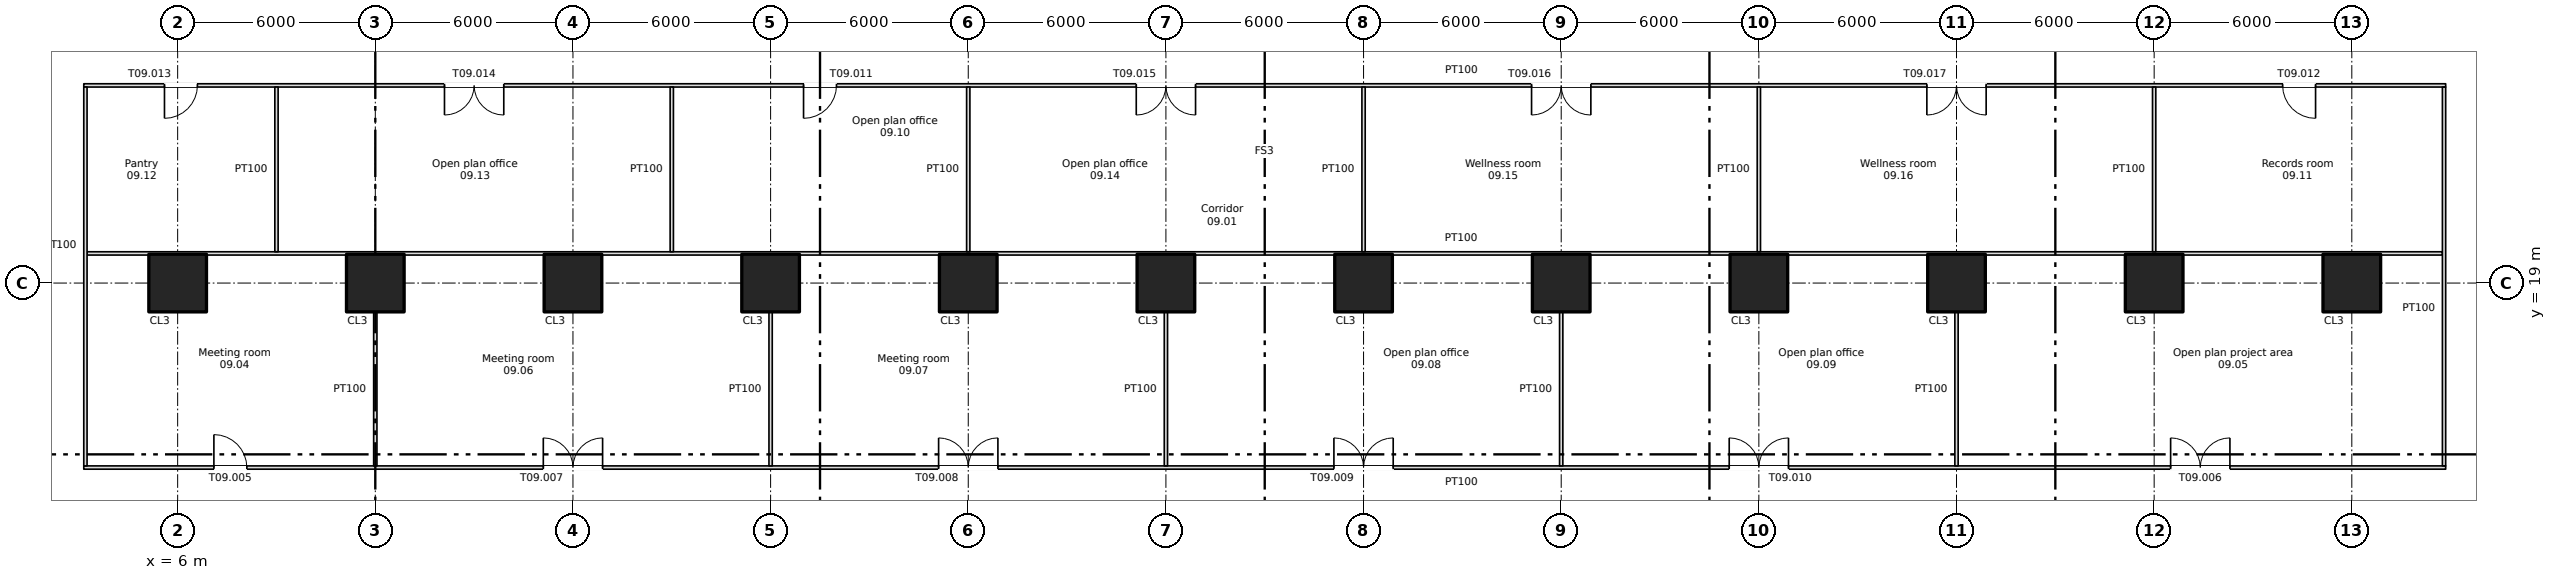
"""IFC4 building model, lengths in metres.
Left out: names, types, materials, properties, quantities, classifications, styles, units other than length and angle.
Written with IfcOpenShell. Run it as: python <this file> out.ifc"""

import sys

from ifc_helpers import new_model, si_unit, direction, frame, frame_2d, origin, origin_2d, place, context, subcontext, project, spatial, rectangle, extrude, element, fill, save


model = new_model("IFC4")
c1 = context("Model", 3, precision=1e-05, world=origin(), true_north=direction((0.0, 1.0)))
c2 = subcontext(c1, "Body", "Model", "MODEL_VIEW")
j1 = project(units=[si_unit("LENGTHUNIT", "METRE"), si_unit("PLANEANGLEUNIT", "RADIAN")], contexts=[c1])
p1 = place(None, origin())
s1 = spatial("IfcSite", under=j1, at=p1, CompositionType="ELEMENT")
p2 = place(p1, origin())
s2 = spatial("IfcBuilding", under=s1, at=p2, CompositionType="ELEMENT")
p3 = place(p2, frame((0.0, 0.0, 37.5)))
s3 = spatial("IfcBuildingStorey", under=s2, at=p3, CompositionType="ELEMENT", Elevation=37.5)
for number, where, z_axis, x_axis in (
    (1, (6.0, 19.0, 0.0), (0.0, 0.0, 1.0), (1.0, 0.0, 0.0)),
    (2, (12.0, 19.0, 0.0), (0.0, 0.0, 1.0), (1.0, 0.0, 0.0)),
    (3, (18.0, 19.0, 0.0), (0.0, 0.0, 1.0), (1.0, 0.0, 0.0)),
    (4, (24.0, 19.0, 0.0), (0.0, 0.0, 1.0), (1.0, 0.0, 0.0)),
    (5, (30.0, 19.0, 0.0), (0.0, 0.0, 1.0), (1.0, 0.0, 0.0)),
    (6, (36.0, 19.0, 0.0), (0.0, 0.0, 1.0), (1.0, 0.0, 0.0)),
    (7, (42.0, 19.0, 0.0), (0.0, 0.0, 1.0), (1.0, 0.0, 0.0)),
    (8, (48.0, 19.0, 0.0), (0.0, 0.0, 1.0), (1.0, 0.0, 0.0)),
    (9, (54.0, 19.0, 0.0), (0.0, 0.0, 1.0), (1.0, 0.0, 0.0)),
    (10, (60.0, 19.0, 0.0), (0.0, 0.0, 1.0), (1.0, 0.0, 0.0)),
    (11, (66.0, 19.0, 0.0), (0.0, 0.0, 1.0), (1.0, 0.0, 0.0)),
    (12, (72.0, 19.0, 0.0), (0.0, 0.0, 1.0), (1.0, 0.0, 0.0)),
):
    element("IfcColumn", number, at=place(p3, frame(where, z_axis=z_axis, x_axis=x_axis)), inside=s3, PredefinedType="COLUMN", context=c2, shape_type="SweptSolid", body=[
        extrude(rectangle(XDim=1.75, YDim=1.75, at=origin_2d()), origin(), (0.0, 0.0, 1.0), 3.35),
    ])
p4 = place(p3, frame((3.15, 13.4, 0.0), z_axis=(0.0, 0.0, 1.0), x_axis=(1.0, 0.0, 0.0)))
e13 = element("IfcWall", 13, at=p4, inside=s3, PredefinedType="PARTITIONING", context=c2, shape_type="SweptSolid", body=[
    extrude(rectangle(XDim=71.7, YDim=0.1, at=frame_2d((35.85, 0.0))), origin(), (0.0, 0.0, 1.0), 3.35),
])
p5 = place(p4, frame((3.95, 0.0, 0.0)))
e14 = element("IfcOpeningElement", 14, at=p5, cuts=e13, PredefinedType="OPENING", context=c2, shape_type="SweptSolid", body=[
    extrude(rectangle(XDim=1.0, YDim=2.1, at=frame_2d((0.5, 1.05))), frame((0.0, 0.06, 0.0), z_axis=(0.0, -1.0, 0.0), x_axis=(1.0, 0.0, 0.0)), (0.0, 0.0, 1.0), 0.12),
])
p6 = place(p4, frame((63.35, 0.0, 0.0)))
e15 = element("IfcOpeningElement", 15, at=p6, cuts=e13, PredefinedType="OPENING", context=c2, shape_type="SweptSolid", body=[
    extrude(rectangle(XDim=1.8, YDim=2.1, at=frame_2d((0.9, 1.05))), frame((0.0, 0.06, 0.0), z_axis=(0.0, -1.0, 0.0), x_axis=(1.0, 0.0, 0.0)), (0.0, 0.0, 1.0), 0.12),
])
p7 = place(p4, frame((13.95, 0.0, 0.0)))
e16 = element("IfcOpeningElement", 16, at=p7, cuts=e13, PredefinedType="OPENING", context=c2, shape_type="SweptSolid", body=[
    extrude(rectangle(XDim=1.8, YDim=2.1, at=frame_2d((0.9, 1.05))), frame((0.0, 0.06, 0.0), z_axis=(0.0, -1.0, 0.0), x_axis=(1.0, 0.0, 0.0)), (0.0, 0.0, 1.0), 0.12),
])
p8 = place(p4, frame((25.95, 0.0, 0.0)))
e17 = element("IfcOpeningElement", 17, at=p8, cuts=e13, PredefinedType="OPENING", context=c2, shape_type="SweptSolid", body=[
    extrude(rectangle(XDim=1.8, YDim=2.1, at=frame_2d((0.9, 1.05))), frame((0.0, 0.06, 0.0), z_axis=(0.0, -1.0, 0.0), x_axis=(1.0, 0.0, 0.0)), (0.0, 0.0, 1.0), 0.12),
])
p9 = place(p4, frame((37.95, 0.0, 0.0)))
e18 = element("IfcOpeningElement", 18, at=p9, cuts=e13, PredefinedType="OPENING", context=c2, shape_type="SweptSolid", body=[
    extrude(rectangle(XDim=1.8, YDim=2.1, at=frame_2d((0.9, 1.05))), frame((0.0, 0.06, 0.0), z_axis=(0.0, -1.0, 0.0), x_axis=(1.0, 0.0, 0.0)), (0.0, 0.0, 1.0), 0.12),
])
p10 = place(p4, frame((49.95, 0.0, 0.0)))
e19 = element("IfcOpeningElement", 19, at=p10, cuts=e13, PredefinedType="OPENING", context=c2, shape_type="SweptSolid", body=[
    extrude(rectangle(XDim=1.8, YDim=2.1, at=frame_2d((0.9, 1.05))), frame((0.0, 0.06, 0.0), z_axis=(0.0, -1.0, 0.0), x_axis=(1.0, 0.0, 0.0)), (0.0, 0.0, 1.0), 0.12),
])
p11 = place(p3, frame((3.25, 19.9, 0.0), z_axis=(0.0, 0.0, 1.0), x_axis=(1.0, 0.0, 0.0)))
e20 = element("IfcWall", 20, at=p11, inside=s3, PredefinedType="PARTITIONING", context=c2, shape_type="SweptSolid", body=[
    extrude(rectangle(XDim=71.5, YDim=0.1, at=frame_2d((35.75, 0.0))), origin(), (0.0, 0.0, 1.0), 3.35),
])
p12 = place(p3, frame((3.15, 25.0, 0.0), z_axis=(0.0, 0.0, 1.0), x_axis=(1.0, 0.0, 0.0)))
e21 = element("IfcWall", 21, at=p12, inside=s3, PredefinedType="PARTITIONING", context=c2, shape_type="SweptSolid", body=[
    extrude(rectangle(XDim=71.7, YDim=0.1, at=frame_2d((35.85, 0.0))), origin(), (0.0, 0.0, 1.0), 3.35),
])
p13 = place(p12, frame((21.85, 0.0, 0.0)))
e22 = element("IfcOpeningElement", 22, at=p13, cuts=e21, PredefinedType="OPENING", context=c2, shape_type="SweptSolid", body=[
    extrude(rectangle(XDim=1.0, YDim=2.1, at=frame_2d((0.5, 1.05))), frame((0.0, 0.06, 0.0), z_axis=(0.0, -1.0, 0.0), x_axis=(1.0, 0.0, 0.0)), (0.0, 0.0, 1.0), 0.12),
])
p14 = place(p12, frame((66.75, 0.0, 0.0)))
e23 = element("IfcOpeningElement", 23, at=p14, cuts=e21, PredefinedType="OPENING", context=c2, shape_type="SweptSolid", body=[
    extrude(rectangle(XDim=1.0, YDim=2.1, at=frame_2d((0.5, 1.05))), frame((0.0, 0.06, 0.0), z_axis=(0.0, -1.0, 0.0), x_axis=(1.0, 0.0, 0.0)), (0.0, 0.0, 1.0), 0.12),
])
p15 = place(p12, frame((2.45, 0.0, 0.0)))
e24 = element("IfcOpeningElement", 24, at=p15, cuts=e21, PredefinedType="OPENING", context=c2, shape_type="SweptSolid", body=[
    extrude(rectangle(XDim=1.0, YDim=2.1, at=frame_2d((0.5, 1.05))), frame((0.0, 0.06, 0.0), z_axis=(0.0, -1.0, 0.0), x_axis=(1.0, 0.0, 0.0)), (0.0, 0.0, 1.0), 0.12),
])
p16 = place(p12, frame((10.95, 0.0, 0.0)))
e25 = element("IfcOpeningElement", 25, at=p16, cuts=e21, PredefinedType="OPENING", context=c2, shape_type="SweptSolid", body=[
    extrude(rectangle(XDim=1.8, YDim=2.1, at=frame_2d((0.9, 1.05))), frame((0.0, 0.06, 0.0), z_axis=(0.0, -1.0, 0.0), x_axis=(1.0, 0.0, 0.0)), (0.0, 0.0, 1.0), 0.12),
])
p17 = place(p12, frame((31.95, 0.0, 0.0)))
e26 = element("IfcOpeningElement", 26, at=p17, cuts=e21, PredefinedType="OPENING", context=c2, shape_type="SweptSolid", body=[
    extrude(rectangle(XDim=1.8, YDim=2.1, at=frame_2d((0.9, 1.05))), frame((0.0, 0.06, 0.0), z_axis=(0.0, -1.0, 0.0), x_axis=(1.0, 0.0, 0.0)), (0.0, 0.0, 1.0), 0.12),
])
p18 = place(p12, frame((43.95, 0.0, 0.0)))
e27 = element("IfcOpeningElement", 27, at=p18, cuts=e21, PredefinedType="OPENING", context=c2, shape_type="SweptSolid", body=[
    extrude(rectangle(XDim=1.8, YDim=2.1, at=frame_2d((0.9, 1.05))), frame((0.0, 0.06, 0.0), z_axis=(0.0, -1.0, 0.0), x_axis=(1.0, 0.0, 0.0)), (0.0, 0.0, 1.0), 0.12),
])
p19 = place(p12, frame((55.95, 0.0, 0.0)))
e28 = element("IfcOpeningElement", 28, at=p19, cuts=e21, PredefinedType="OPENING", context=c2, shape_type="SweptSolid", body=[
    extrude(rectangle(XDim=1.8, YDim=2.1, at=frame_2d((0.9, 1.05))), frame((0.0, 0.06, 0.0), z_axis=(0.0, -1.0, 0.0), x_axis=(1.0, 0.0, 0.0)), (0.0, 0.0, 1.0), 0.12),
])
p20 = place(p3, frame((3.2, 13.45, 0.0), z_axis=(0.0, 0.0, 1.0), x_axis=(0.0, 1.0, 0.0)))
e29 = element("IfcWall", 29, at=p20, inside=s3, PredefinedType="PARTITIONING", context=c2, shape_type="SweptSolid", body=[
    extrude(rectangle(XDim=11.5, YDim=0.1, at=frame_2d((5.75, 0.0))), origin(), (0.0, 0.0, 1.0), 3.35),
])
p21 = place(p3, frame((9.0, 19.95, 0.0), z_axis=(0.0, 0.0, 1.0), x_axis=(0.0, 1.0, 0.0)))
e30 = element("IfcWall", 30, at=p21, inside=s3, PredefinedType="PARTITIONING", context=c2, shape_type="SweptSolid", body=[
    extrude(rectangle(XDim=5.0, YDim=0.1, at=frame_2d((2.5, 0.0))), origin(), (0.0, 0.0, 1.0), 3.35),
])
p22 = place(p3, frame((12.0, 13.45, 0.0), z_axis=(0.0, 0.0, 1.0), x_axis=(0.0, 1.0, 0.0)))
e31 = element("IfcWall", 31, at=p22, inside=s3, PredefinedType="PARTITIONING", context=c2, shape_type="SweptSolid", body=[
    extrude(rectangle(XDim=4.675, YDim=0.1, at=frame_2d((2.337, 0.0))), origin(), (0.0, 0.0, 1.0), 3.35),
])
p23 = place(p3, frame((21.0, 19.95, 0.0), z_axis=(0.0, 0.0, 1.0), x_axis=(0.0, 1.0, 0.0)))
e32 = element("IfcWall", 32, at=p23, inside=s3, PredefinedType="PARTITIONING", context=c2, shape_type="SweptSolid", body=[
    extrude(rectangle(XDim=5.0, YDim=0.1, at=frame_2d((2.5, 0.0))), origin(), (0.0, 0.0, 1.0), 3.35),
])
p24 = place(p3, frame((24.0, 13.45, 0.0), z_axis=(0.0, 0.0, 1.0), x_axis=(0.0, 1.0, 0.0)))
e33 = element("IfcWall", 33, at=p24, inside=s3, PredefinedType="PARTITIONING", context=c2, shape_type="SweptSolid", body=[
    extrude(rectangle(XDim=4.675, YDim=0.1, at=frame_2d((2.337, 0.0))), origin(), (0.0, 0.0, 1.0), 3.35),
])
p25 = place(p3, frame((30.0, 19.95, 0.0), z_axis=(0.0, 0.0, 1.0), x_axis=(0.0, 1.0, 0.0)))
e34 = element("IfcWall", 34, at=p25, inside=s3, PredefinedType="PARTITIONING", context=c2, shape_type="SweptSolid", body=[
    extrude(rectangle(XDim=5.0, YDim=0.1, at=frame_2d((2.5, 0.0))), origin(), (0.0, 0.0, 1.0), 3.35),
])
p26 = place(p3, frame((36.0, 13.45, 0.0), z_axis=(0.0, 0.0, 1.0), x_axis=(0.0, 1.0, 0.0)))
e35 = element("IfcWall", 35, at=p26, inside=s3, PredefinedType="PARTITIONING", context=c2, shape_type="SweptSolid", body=[
    extrude(rectangle(XDim=4.675, YDim=0.1, at=frame_2d((2.337, 0.0))), origin(), (0.0, 0.0, 1.0), 3.35),
])
p27 = place(p3, frame((42.0, 19.95, 0.0), z_axis=(0.0, 0.0, 1.0), x_axis=(0.0, 1.0, 0.0)))
e36 = element("IfcWall", 36, at=p27, inside=s3, PredefinedType="PARTITIONING", context=c2, shape_type="SweptSolid", body=[
    extrude(rectangle(XDim=5.0, YDim=0.1, at=frame_2d((2.5, 0.0))), origin(), (0.0, 0.0, 1.0), 3.35),
])
p28 = place(p3, frame((48.0, 13.45, 0.0), z_axis=(0.0, 0.0, 1.0), x_axis=(0.0, 1.0, 0.0)))
e37 = element("IfcWall", 37, at=p28, inside=s3, PredefinedType="PARTITIONING", context=c2, shape_type="SweptSolid", body=[
    extrude(rectangle(XDim=4.675, YDim=0.1, at=frame_2d((2.337, 0.0))), origin(), (0.0, 0.0, 1.0), 3.35),
])
p29 = place(p3, frame((54.0, 19.95, 0.0), z_axis=(0.0, 0.0, 1.0), x_axis=(0.0, 1.0, 0.0)))
e38 = element("IfcWall", 38, at=p29, inside=s3, PredefinedType="PARTITIONING", context=c2, shape_type="SweptSolid", body=[
    extrude(rectangle(XDim=5.0, YDim=0.1, at=frame_2d((2.5, 0.0))), origin(), (0.0, 0.0, 1.0), 3.35),
])
p30 = place(p3, frame((60.0, 13.45, 0.0), z_axis=(0.0, 0.0, 1.0), x_axis=(0.0, 1.0, 0.0)))
e39 = element("IfcWall", 39, at=p30, inside=s3, PredefinedType="PARTITIONING", context=c2, shape_type="SweptSolid", body=[
    extrude(rectangle(XDim=4.675, YDim=0.1, at=frame_2d((2.337, 0.0))), origin(), (0.0, 0.0, 1.0), 3.35),
])
p31 = place(p3, frame((66.0, 19.95, 0.0), z_axis=(0.0, 0.0, 1.0), x_axis=(0.0, 1.0, 0.0)))
e40 = element("IfcWall", 40, at=p31, inside=s3, PredefinedType="PARTITIONING", context=c2, shape_type="SweptSolid", body=[
    extrude(rectangle(XDim=5.0, YDim=0.1, at=frame_2d((2.5, 0.0))), origin(), (0.0, 0.0, 1.0), 3.35),
])
p32 = place(p3, frame((74.8, 13.45, 0.0), z_axis=(0.0, 0.0, 1.0), x_axis=(0.0, 1.0, 0.0)))
e41 = element("IfcWall", 41, at=p32, inside=s3, PredefinedType="PARTITIONING", context=c2, shape_type="SweptSolid", body=[
    extrude(rectangle(XDim=11.5, YDim=0.1, at=frame_2d((5.75, 0.0))), origin(), (0.0, 0.0, 1.0), 3.35),
])
p33 = place(p5, origin())
e42 = element("IfcDoor", 42, at=p33, inside=s3, OperationType="SINGLE_SWING_LEFT", PredefinedType="DOOR", context=c2, shape_type="SweptSolid", body=[
    extrude(rectangle(XDim=1.0, YDim=2.1, at=frame_2d((0.5, 1.05))), frame((0.0, 0.025, 0.0), z_axis=(0.0, -1.0, 0.0), x_axis=(1.0, 0.0, 0.0)), (0.0, 0.0, 1.0), 0.05),
])
fill(e14, e42)
p34 = place(p6, origin())
e43 = element("IfcDoor", 43, at=p34, inside=s3, OperationType="DOUBLE_DOOR_SINGLE_SWING", PredefinedType="DOOR", context=c2, shape_type="SweptSolid", body=[
    extrude(rectangle(XDim=1.8, YDim=2.1, at=frame_2d((0.9, 1.05))), frame((0.0, 0.025, 0.0), z_axis=(0.0, -1.0, 0.0), x_axis=(1.0, 0.0, 0.0)), (0.0, 0.0, 1.0), 0.05),
])
fill(e15, e43)
p35 = place(p7, origin())
e44 = element("IfcDoor", 44, at=p35, inside=s3, OperationType="DOUBLE_DOOR_SINGLE_SWING", PredefinedType="DOOR", context=c2, shape_type="SweptSolid", body=[
    extrude(rectangle(XDim=1.8, YDim=2.1, at=frame_2d((0.9, 1.05))), frame((0.0, 0.025, 0.0), z_axis=(0.0, -1.0, 0.0), x_axis=(1.0, 0.0, 0.0)), (0.0, 0.0, 1.0), 0.05),
])
fill(e16, e44)
p36 = place(p8, origin())
e45 = element("IfcDoor", 45, at=p36, inside=s3, OperationType="DOUBLE_DOOR_SINGLE_SWING", PredefinedType="DOOR", context=c2, shape_type="SweptSolid", body=[
    extrude(rectangle(XDim=1.8, YDim=2.1, at=frame_2d((0.9, 1.05))), frame((0.0, 0.025, 0.0), z_axis=(0.0, -1.0, 0.0), x_axis=(1.0, 0.0, 0.0)), (0.0, 0.0, 1.0), 0.05),
])
fill(e17, e45)
p37 = place(p9, origin())
e46 = element("IfcDoor", 46, at=p37, inside=s3, OperationType="DOUBLE_DOOR_SINGLE_SWING", PredefinedType="DOOR", context=c2, shape_type="SweptSolid", body=[
    extrude(rectangle(XDim=1.8, YDim=2.1, at=frame_2d((0.9, 1.05))), frame((0.0, 0.025, 0.0), z_axis=(0.0, -1.0, 0.0), x_axis=(1.0, 0.0, 0.0)), (0.0, 0.0, 1.0), 0.05),
])
fill(e18, e46)
p38 = place(p10, origin())
e47 = element("IfcDoor", 47, at=p38, inside=s3, OperationType="DOUBLE_DOOR_SINGLE_SWING", PredefinedType="DOOR", context=c2, shape_type="SweptSolid", body=[
    extrude(rectangle(XDim=1.8, YDim=2.1, at=frame_2d((0.9, 1.05))), frame((0.0, 0.025, 0.0), z_axis=(0.0, -1.0, 0.0), x_axis=(1.0, 0.0, 0.0)), (0.0, 0.0, 1.0), 0.05),
])
fill(e19, e47)
p39 = place(p13, origin())
e48 = element("IfcDoor", 48, at=p39, inside=s3, OperationType="SINGLE_SWING_LEFT", PredefinedType="DOOR", context=c2, shape_type="SweptSolid", body=[
    extrude(rectangle(XDim=1.0, YDim=2.1, at=frame_2d((0.5, 1.05))), frame((0.0, 0.025, 0.0), z_axis=(0.0, -1.0, 0.0), x_axis=(1.0, 0.0, 0.0)), (0.0, 0.0, 1.0), 0.05),
])
fill(e22, e48)
p40 = place(p14, origin())
e49 = element("IfcDoor", 49, at=p40, inside=s3, OperationType="SINGLE_SWING_RIGHT", PredefinedType="DOOR", context=c2, shape_type="SweptSolid", body=[
    extrude(rectangle(XDim=1.0, YDim=2.1, at=frame_2d((0.5, 1.05))), frame((0.0, 0.025, 0.0), z_axis=(0.0, -1.0, 0.0), x_axis=(1.0, 0.0, 0.0)), (0.0, 0.0, 1.0), 0.05),
])
fill(e23, e49)
p41 = place(p15, origin())
e50 = element("IfcDoor", 50, at=p41, inside=s3, OperationType="SINGLE_SWING_LEFT", PredefinedType="DOOR", context=c2, shape_type="SweptSolid", body=[
    extrude(rectangle(XDim=1.0, YDim=2.1, at=frame_2d((0.5, 1.05))), frame((0.0, 0.025, 0.0), z_axis=(0.0, -1.0, 0.0), x_axis=(1.0, 0.0, 0.0)), (0.0, 0.0, 1.0), 0.05),
])
fill(e24, e50)
p42 = place(p16, origin())
e51 = element("IfcDoor", 51, at=p42, inside=s3, OperationType="DOUBLE_DOOR_SINGLE_SWING", PredefinedType="DOOR", context=c2, shape_type="SweptSolid", body=[
    extrude(rectangle(XDim=1.8, YDim=2.1, at=frame_2d((0.9, 1.05))), frame((0.0, 0.025, 0.0), z_axis=(0.0, -1.0, 0.0), x_axis=(1.0, 0.0, 0.0)), (0.0, 0.0, 1.0), 0.05),
])
fill(e25, e51)
p43 = place(p17, origin())
e52 = element("IfcDoor", 52, at=p43, inside=s3, OperationType="DOUBLE_DOOR_SINGLE_SWING", PredefinedType="DOOR", context=c2, shape_type="SweptSolid", body=[
    extrude(rectangle(XDim=1.8, YDim=2.1, at=frame_2d((0.9, 1.05))), frame((0.0, 0.025, 0.0), z_axis=(0.0, -1.0, 0.0), x_axis=(1.0, 0.0, 0.0)), (0.0, 0.0, 1.0), 0.05),
])
fill(e26, e52)
p44 = place(p18, origin())
e53 = element("IfcDoor", 53, at=p44, inside=s3, OperationType="DOUBLE_DOOR_SINGLE_SWING", PredefinedType="DOOR", context=c2, shape_type="SweptSolid", body=[
    extrude(rectangle(XDim=1.8, YDim=2.1, at=frame_2d((0.9, 1.05))), frame((0.0, 0.025, 0.0), z_axis=(0.0, -1.0, 0.0), x_axis=(1.0, 0.0, 0.0)), (0.0, 0.0, 1.0), 0.05),
])
fill(e27, e53)
p45 = place(p19, origin())
e54 = element("IfcDoor", 54, at=p45, inside=s3, OperationType="DOUBLE_DOOR_SINGLE_SWING", PredefinedType="DOOR", context=c2, shape_type="SweptSolid", body=[
    extrude(rectangle(XDim=1.8, YDim=2.1, at=frame_2d((0.9, 1.05))), frame((0.0, 0.025, 0.0), z_axis=(0.0, -1.0, 0.0), x_axis=(1.0, 0.0, 0.0)), (0.0, 0.0, 1.0), 0.05),
])
fill(e28, e54)
save(model, sys.argv[1])
